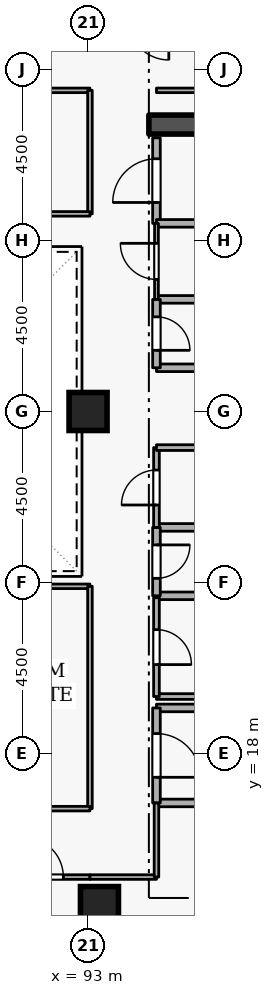
"""IFC4 building model, lengths in metres.
Left out: names, types, materials, properties, quantities, classifications, styles, units other than length and angle.
Written with IfcOpenShell. Run it as: python <this file> out.ifc"""

import sys

from ifc_helpers import new_model, si_unit, direction, frame, frame_2d, origin, origin_2d, place, context, subcontext, project, spatial, rectangle, extrude, element, fill, save


model = new_model("IFC4")
c1 = context("Model", 3, precision=1e-05, world=origin(), true_north=direction((0.0, 1.0)))
c2 = subcontext(c1, "Body", "Model", "MODEL_VIEW")
j1 = project(units=[si_unit("LENGTHUNIT", "METRE"), si_unit("PLANEANGLEUNIT", "RADIAN")], contexts=[c1])
p1 = place(None, origin())
s1 = spatial("IfcSite", under=j1, at=p1, CompositionType="ELEMENT")
p2 = place(p1, origin())
s2 = spatial("IfcBuilding", under=s1, at=p2, CompositionType="ELEMENT")
p3 = place(p2, frame((0.0, 0.0, 207.3)))
s3 = spatial("IfcBuildingStorey", under=s2, at=p3, CompositionType="ELEMENT", Elevation=207.3)
p4 = place(p3, frame((94.6, 34.55, 0.0), z_axis=(0.0, 0.0, 1.0), x_axis=(1.0, 0.0, 0.0)))
e1 = element("IfcWall", 1, at=p4, inside=s3, PredefinedType="SHEAR", context=c2, shape_type="SweptSolid", body=[
    extrude(rectangle(XDim=5.8, YDim=0.5, at=frame_2d((2.9, 0.0))), origin(), (0.0, 0.0, 1.0), 3.6),
])
for number, where, z_axis, x_axis in (
    (2, (93.3, 14.0, 0.0), (0.0, 0.0, 1.0), (1.0, 0.0, 0.0)),
    (3, (93.0, 27.0, 0.0), (0.0, 0.0, 1.0), (1.0, 0.0, 0.0)),
):
    element("IfcColumn", number, at=place(p3, frame(where, z_axis=z_axis, x_axis=x_axis)), inside=s3, PredefinedType="COLUMN", context=c2, shape_type="SweptSolid", body=[
        extrude(rectangle(XDim=1.0, YDim=1.0, at=origin_2d()), origin(), (0.0, 0.0, 1.0), 3.6),
    ])
p5 = place(p3, frame((94.8, 16.7, 0.0), z_axis=(0.0, 0.0, 1.0), x_axis=(1.0, 0.0, 0.0)))
e4 = element("IfcWall", 4, at=p5, inside=s3, PredefinedType="STANDARD", context=c2, shape_type="SweptSolid", body=[
    extrude(rectangle(XDim=5.7, YDim=0.2, at=frame_2d((2.85, 0.0))), origin(), (0.0, 0.0, 1.0), 3.34),
])
p6 = place(p3, frame((97.1, 19.2, 0.0), z_axis=(0.0, 0.0, 1.0), x_axis=(-1.0, 0.0, 0.0)))
e5 = element("IfcWall", 5, at=p6, inside=s3, PredefinedType="STANDARD", context=c2, shape_type="SweptSolid", body=[
    extrude(rectangle(XDim=2.3, YDim=0.2, at=frame_2d((1.15, 0.0))), origin(), (0.0, 0.0, 1.0), 2.545),
])
p7 = place(p3, frame((94.8, 19.2, 0.0), z_axis=(0.0, 0.0, 1.0), x_axis=(0.0, -1.0, 0.0)))
e6 = element("IfcWall", 6, at=p7, inside=s3, PredefinedType="STANDARD", context=c2, shape_type="SweptSolid", body=[
    extrude(rectangle(XDim=2.5, YDim=0.2, at=frame_2d((1.25, 0.0))), origin(), (0.0, 0.0, 1.0), 3.34),
])
p8 = place(p7, frame((0.675, 0.0, 0.0)))
e7 = element("IfcOpeningElement", 7, at=p8, cuts=e6, PredefinedType="OPENING", context=c2, shape_type="SweptSolid", body=[
    extrude(rectangle(XDim=1.15, YDim=2.1, at=frame_2d((0.575, 1.05))), frame((0.0, 0.11, 0.0), z_axis=(0.0, -1.0, 0.0), x_axis=(1.0, 0.0, 0.0)), (0.0, 0.0, 1.0), 0.22),
])
for number, where, z_axis, x_axis in (
    (8, (94.8, 28.15, 0.0), (0.0, 0.0, 1.0), (1.0, 0.0, 0.0)),
    (9, (96.85, 29.95, 0.0), (0.0, 0.0, 1.0), (-1.0, 0.0, 0.0)),
):
    element("IfcWall", number, at=place(p3, frame(where, z_axis=z_axis, x_axis=x_axis)), inside=s3, PredefinedType="STANDARD", context=c2, shape_type="SweptSolid", body=[
        extrude(rectangle(XDim=2.05, YDim=0.2, at=frame_2d((1.025, 0.0))), origin(), (0.0, 0.0, 1.0), 3.34),
    ])
p9 = place(p3, frame((94.8, 29.95, 0.0), z_axis=(0.0, 0.0, 1.0), x_axis=(0.0, -1.0, 0.0)))
e10 = element("IfcWall", 10, at=p9, inside=s3, PredefinedType="STANDARD", context=c2, shape_type="SweptSolid", body=[
    extrude(rectangle(XDim=1.8, YDim=0.2, at=frame_2d((0.9, 0.0))), origin(), (0.0, 0.0, 1.0), 3.34),
])
p10 = place(p9, frame((0.46, 0.0, 0.0)))
e11 = element("IfcOpeningElement", 11, at=p10, cuts=e10, PredefinedType="OPENING", context=c2, shape_type="SweptSolid", body=[
    extrude(rectangle(XDim=0.88, YDim=2.04, at=frame_2d((0.44, 1.02))), frame((0.0, 0.11, 0.0), z_axis=(0.0, -1.0, 0.0), x_axis=(1.0, 0.0, 0.0)), (0.0, 0.0, 1.0), 0.22),
])
for number, where, z_axis, x_axis in (
    (12, (94.8, 22.15, 0.0), (0.0, 0.0, 1.0), (1.0, 0.0, 0.0)),
    (13, (96.85, 23.95, 0.0), (0.0, 0.0, 1.0), (-1.0, 0.0, 0.0)),
):
    element("IfcWall", number, at=place(p3, frame(where, z_axis=z_axis, x_axis=x_axis)), inside=s3, PredefinedType="STANDARD", context=c2, shape_type="SweptSolid", body=[
        extrude(rectangle(XDim=2.05, YDim=0.2, at=frame_2d((1.025, 0.0))), origin(), (0.0, 0.0, 1.0), 3.34),
    ])
p11 = place(p3, frame((94.8, 23.95, 0.0), z_axis=(0.0, 0.0, 1.0), x_axis=(0.0, -1.0, 0.0)))
e14 = element("IfcWall", 14, at=p11, inside=s3, PredefinedType="STANDARD", context=c2, shape_type="SweptSolid", body=[
    extrude(rectangle(XDim=1.8, YDim=0.2, at=frame_2d((0.9, 0.0))), origin(), (0.0, 0.0, 1.0), 3.34),
])
p12 = place(p11, frame((0.46, 0.0, 0.0)))
e15 = element("IfcOpeningElement", 15, at=p12, cuts=e14, PredefinedType="OPENING", context=c2, shape_type="SweptSolid", body=[
    extrude(rectangle(XDim=0.88, YDim=2.04, at=frame_2d((0.44, 1.02))), frame((0.0, 0.11, 0.0), z_axis=(0.0, -1.0, 0.0), x_axis=(1.0, 0.0, 0.0)), (0.0, 0.0, 1.0), 0.22),
])
p13 = place(p3, frame((94.8, 31.95, 0.0), z_axis=(0.0, 0.0, 1.0), x_axis=(0.0, 1.0, 0.0)))
e16 = element("IfcWall", 16, at=p13, inside=s3, PredefinedType="STANDARD", context=c2, shape_type="SweptSolid", body=[
    extrude(rectangle(XDim=2.25, YDim=0.2, at=frame_2d((1.125, 0.0))), origin(), (0.0, 0.0, 1.0), 3.34),
])
p14 = place(p13, frame((0.55, 0.0, 0.0)))
e17 = element("IfcOpeningElement", 17, at=p14, cuts=e16, PredefinedType="OPENING", context=c2, shape_type="SweptSolid", body=[
    extrude(rectangle(XDim=1.15, YDim=2.1, at=frame_2d((0.575, 1.05))), frame((0.0, 0.11, 0.0), z_axis=(0.0, -1.0, 0.0), x_axis=(1.0, 0.0, 0.0)), (0.0, 0.0, 1.0), 0.22),
])
p15 = place(p3, frame((96.85, 31.95, 0.0), z_axis=(0.0, 0.0, 1.0), x_axis=(-1.0, 0.0, 0.0)))
e18 = element("IfcWall", 18, at=p15, inside=s3, PredefinedType="STANDARD", context=c2, shape_type="SweptSolid", body=[
    extrude(rectangle(XDim=2.05, YDim=0.2, at=frame_2d((1.025, 0.0))), origin(), (0.0, 0.0, 1.0), 3.34),
])
p16 = place(p3, frame((94.8, 19.5, 0.0), z_axis=(0.0, 0.0, 1.0), x_axis=(1.0, 0.0, 0.0)))
e19 = element("IfcWall", 19, at=p16, inside=s3, PredefinedType="PARTITIONING", context=c2, shape_type="SweptSolid", body=[
    extrude(rectangle(XDim=2.05, YDim=0.15, at=frame_2d((1.025, 0.0))), origin(), (0.0, 0.0, 1.0), 2.545),
])
p17 = place(p3, frame((94.8, 22.1, 0.0), z_axis=(0.0, 0.0, 1.0), x_axis=(0.0, -1.0, 0.0)))
e20 = element("IfcWall", 20, at=p17, inside=s3, PredefinedType="PARTITIONING", context=c2, shape_type="SweptSolid", body=[
    extrude(rectangle(XDim=2.6, YDim=0.15, at=frame_2d((1.3, 0.0))), origin(), (0.0, 0.0, 1.0), 3.34),
])
p18 = place(p17, frame((0.84, 0.0, 0.0)))
e21 = element("IfcOpeningElement", 21, at=p18, cuts=e20, PredefinedType="OPENING", context=c2, shape_type="SweptSolid", body=[
    extrude(rectangle(XDim=0.92, YDim=2.08, at=frame_2d((0.46, 1.04))), frame((0.0, 0.085, 0.0), z_axis=(0.0, -1.0, 0.0), x_axis=(1.0, 0.0, 0.0)), (0.0, 0.0, 1.0), 0.17),
])
p19 = place(p3, frame((94.8, 23.95, 0.0), z_axis=(0.0, 0.0, 1.0), x_axis=(0.0, 1.0, 0.0)))
e22 = element("IfcWall", 22, at=p19, inside=s3, PredefinedType="PARTITIONING", context=c2, shape_type="SweptSolid", body=[
    extrude(rectangle(XDim=2.1, YDim=0.15, at=frame_2d((1.05, 0.0))), origin(), (0.0, 0.0, 1.0), 3.34),
])
p20 = place(p19, frame((0.59, 0.0, 0.0)))
e23 = element("IfcOpeningElement", 23, at=p20, cuts=e22, PredefinedType="OPENING", context=c2, shape_type="SweptSolid", body=[
    extrude(rectangle(XDim=0.92, YDim=2.08, at=frame_2d((0.46, 1.04))), frame((0.0, 0.085, 0.0), z_axis=(0.0, -1.0, 0.0), x_axis=(1.0, 0.0, 0.0)), (0.0, 0.0, 1.0), 0.17),
])
p21 = place(p3, frame((94.8, 26.05, 0.0), z_axis=(0.0, 0.0, 1.0), x_axis=(1.0, 0.0, 0.0)))
e24 = element("IfcWall", 24, at=p21, inside=s3, PredefinedType="PARTITIONING", context=c2, shape_type="SweptSolid", body=[
    extrude(rectangle(XDim=2.05, YDim=0.15, at=frame_2d((1.025, 0.0))), origin(), (0.0, 0.0, 1.0), 3.34),
])
p22 = place(p3, frame((94.8, 29.95, 0.0), z_axis=(0.0, 0.0, 1.0), x_axis=(0.0, 1.0, 0.0)))
e25 = element("IfcWall", 25, at=p22, inside=s3, PredefinedType="PARTITIONING", context=c2, shape_type="SweptSolid", body=[
    extrude(rectangle(XDim=2.0, YDim=0.1, at=frame_2d((1.0, 0.0))), origin(), (0.0, 0.0, 1.0), 3.34),
])
p23 = place(p22, frame((0.525, 0.0, 0.0)))
e26 = element("IfcOpeningElement", 26, at=p23, cuts=e25, PredefinedType="OPENING", context=c2, shape_type="SweptSolid", body=[
    extrude(rectangle(XDim=0.95, YDim=2.1, at=frame_2d((0.475, 1.05))), frame((0.0, 0.06, 0.0), z_axis=(0.0, -1.0, 0.0), x_axis=(1.0, 0.0, 0.0)), (0.0, 0.0, 1.0), 0.12),
])
p24 = place(p3, frame((94.8, 35.45, 0.0), z_axis=(0.0, 0.0, 1.0), x_axis=(1.0, 0.0, 0.0)))
e27 = element("IfcWall", 27, at=p24, inside=s3, PredefinedType="PARTITIONING", context=c2, shape_type="SweptSolid", body=[
    extrude(rectangle(XDim=5.9, YDim=0.12, at=frame_2d((2.95, 0.0))), origin(), (0.0, 0.0, 1.0), 3.34),
])
p25 = place(p3, frame((90.6, 14.75, 0.0), z_axis=(0.0, 0.0, 1.0), x_axis=(1.0, 0.0, 0.0)))
e28 = element("IfcWall", 28, at=p25, inside=s3, PredefinedType="PARTITIONING", context=c2, shape_type="SweptSolid", body=[
    extrude(rectangle(XDim=2.45, YDim=0.12, at=frame_2d((1.225, 0.0))), origin(), (0.0, 0.0, 1.0), 3.34),
])
p26 = place(p25, frame((0.7, 0.0, 0.0)))
e29 = element("IfcOpeningElement", 29, at=p26, cuts=e28, PredefinedType="OPENING", context=c2, shape_type="SweptSolid", body=[
    extrude(rectangle(XDim=1.05, YDim=2.1, at=frame_2d((0.525, 1.05))), frame((0.0, 0.07, 0.0), z_axis=(0.0, -1.0, 0.0), x_axis=(1.0, 0.0, 0.0)), (0.0, 0.0, 1.0), 0.14),
])
p27 = place(p3, frame((93.05, 14.75, 0.0), z_axis=(0.0, 0.0, 1.0), x_axis=(1.0, 0.0, 0.0)))
e30 = element("IfcWall", 30, at=p27, inside=s3, PredefinedType="PARTITIONING", context=c2, shape_type="SweptSolid", body=[
    extrude(rectangle(XDim=1.75, YDim=0.12, at=frame_2d((0.875, 0.0))), origin(), (0.0, 0.0, 1.0), 3.34),
])
p28 = place(p3, frame((94.8, 14.75, 0.0), z_axis=(0.0, 0.0, 1.0), x_axis=(0.0, 1.0, 0.0)))
e31 = element("IfcWall", 31, at=p28, inside=s3, PredefinedType="PARTITIONING", context=c2, shape_type="SweptSolid", body=[
    extrude(rectangle(XDim=1.95, YDim=0.12, at=frame_2d((0.975, 0.0))), origin(), (0.0, 0.0, 1.0), 3.34),
])
p29 = place(p3, frame((83.95, 22.4, 0.0), z_axis=(0.0, 0.0, 1.0), x_axis=(1.0, 0.0, 0.0)))
e32 = element("IfcWall", 32, at=p29, inside=s3, PredefinedType="PARTITIONING", context=c2, shape_type="SweptSolid", body=[
    extrude(rectangle(XDim=9.1, YDim=0.12, at=frame_2d((4.55, 0.0))), origin(), (0.0, 0.0, 1.0), 3.34),
])
p30 = place(p3, frame((93.05, 22.4, 0.0), z_axis=(0.0, 0.0, 1.0), x_axis=(0.0, -1.0, 0.0)))
e33 = element("IfcWall", 33, at=p30, inside=s3, PredefinedType="PARTITIONING", context=c2, shape_type="SweptSolid", body=[
    extrude(rectangle(XDim=5.85, YDim=0.12, at=frame_2d((2.925, 0.0))), origin(), (0.0, 0.0, 1.0), 3.34),
])
p31 = place(p3, frame((93.05, 16.55, 0.0), z_axis=(0.0, 0.0, 1.0), x_axis=(-1.0, 0.0, 0.0)))
e34 = element("IfcWall", 34, at=p31, inside=s3, PredefinedType="PARTITIONING", context=c2, shape_type="SweptSolid", body=[
    extrude(rectangle(XDim=9.1, YDim=0.12, at=frame_2d((4.55, 0.0))), origin(), (0.0, 0.0, 1.0), 3.34),
])
p32 = place(p31, frame((4.075, 0.0, 0.0)))
e35 = element("IfcOpeningElement", 35, at=p32, cuts=e34, PredefinedType="OPENING", context=c2, shape_type="SweptSolid", body=[
    extrude(rectangle(XDim=0.95, YDim=2.1, at=frame_2d((0.475, 1.05))), frame((0.0, 0.07, 0.0), z_axis=(0.0, -1.0, 0.0), x_axis=(1.0, 0.0, 0.0)), (0.0, 0.0, 1.0), 0.14),
])
p33 = place(p3, frame((83.95, 35.45, 0.0), z_axis=(0.0, 0.0, 1.0), x_axis=(1.0, 0.0, 0.0)))
e36 = element("IfcWall", 36, at=p33, inside=s3, PredefinedType="PARTITIONING", context=c2, shape_type="SweptSolid", body=[
    extrude(rectangle(XDim=9.1, YDim=0.12, at=frame_2d((4.55, 0.0))), origin(), (0.0, 0.0, 1.0), 3.34),
])
p34 = place(p33, frame((4.075, 0.0, 0.0)))
e37 = element("IfcOpeningElement", 37, at=p34, cuts=e36, PredefinedType="OPENING", context=c2, shape_type="SweptSolid", body=[
    extrude(rectangle(XDim=0.95, YDim=2.1, at=frame_2d((0.475, 1.05))), frame((0.0, 0.07, 0.0), z_axis=(0.0, -1.0, 0.0), x_axis=(1.0, 0.0, 0.0)), (0.0, 0.0, 1.0), 0.14),
])
p35 = place(p3, frame((93.05, 35.45, 0.0), z_axis=(0.0, 0.0, 1.0), x_axis=(0.0, -1.0, 0.0)))
e38 = element("IfcWall", 38, at=p35, inside=s3, PredefinedType="PARTITIONING", context=c2, shape_type="SweptSolid", body=[
    extrude(rectangle(XDim=3.25, YDim=0.12, at=frame_2d((1.625, 0.0))), origin(), (0.0, 0.0, 1.0), 3.34),
])
p36 = place(p3, frame((93.05, 32.2, 0.0), z_axis=(0.0, 0.0, 1.0), x_axis=(-1.0, 0.0, 0.0)))
e39 = element("IfcWall", 39, at=p36, inside=s3, PredefinedType="PARTITIONING", context=c2, shape_type="SweptSolid", body=[
    extrude(rectangle(XDim=9.1, YDim=0.12, at=frame_2d((4.55, 0.0))), origin(), (0.0, 0.0, 1.0), 3.34),
])
p37 = place(p8, origin())
e40 = element("IfcDoor", 40, at=p37, inside=s3, OperationType="SINGLE_SWING_RIGHT", PredefinedType="DOOR", context=c2, shape_type="SweptSolid", body=[
    extrude(rectangle(XDim=1.15, YDim=2.1, at=frame_2d((0.575, 1.05))), frame((0.0, 0.025, 0.0), z_axis=(0.0, -1.0, 0.0), x_axis=(1.0, 0.0, 0.0)), (0.0, 0.0, 1.0), 0.05),
])
fill(e7, e40)
p38 = place(p10, origin())
e41 = element("IfcDoor", 41, at=p38, inside=s3, OperationType="SINGLE_SWING_RIGHT", PredefinedType="DOOR", context=c2, shape_type="SweptSolid", body=[
    extrude(rectangle(XDim=0.88, YDim=2.04, at=frame_2d((0.44, 1.02))), frame((0.0, 0.025, 0.0), z_axis=(0.0, -1.0, 0.0), x_axis=(1.0, 0.0, 0.0)), (0.0, 0.0, 1.0), 0.05),
])
fill(e11, e41)
p39 = place(p12, origin())
e42 = element("IfcDoor", 42, at=p39, inside=s3, OperationType="SINGLE_SWING_LEFT", PredefinedType="DOOR", context=c2, shape_type="SweptSolid", body=[
    extrude(rectangle(XDim=0.88, YDim=2.04, at=frame_2d((0.44, 1.02))), frame((0.0, 0.025, 0.0), z_axis=(0.0, -1.0, 0.0), x_axis=(1.0, 0.0, 0.0)), (0.0, 0.0, 1.0), 0.05),
])
fill(e15, e42)
p40 = place(p18, origin())
e43 = element("IfcDoor", 43, at=p40, inside=s3, OperationType="SINGLE_SWING_RIGHT", PredefinedType="DOOR", context=c2, shape_type="SweptSolid", body=[
    extrude(rectangle(XDim=0.92, YDim=2.08, at=frame_2d((0.46, 1.04))), frame((0.0, 0.025, 0.0), z_axis=(0.0, -1.0, 0.0), x_axis=(1.0, 0.0, 0.0)), (0.0, 0.0, 1.0), 0.05),
])
fill(e21, e43)
p41 = place(p20, origin())
e44 = element("IfcDoor", 44, at=p41, inside=s3, OperationType="SINGLE_SWING_LEFT", PredefinedType="DOOR", context=c2, shape_type="SweptSolid", body=[
    extrude(rectangle(XDim=0.92, YDim=2.08, at=frame_2d((0.46, 1.04))), frame((0.0, 0.025, 0.0), z_axis=(0.0, -1.0, 0.0), x_axis=(1.0, 0.0, 0.0)), (0.0, 0.0, 1.0), 0.05),
])
fill(e23, e44)
p42 = place(p23, origin())
e45 = element("IfcDoor", 45, at=p42, inside=s3, OperationType="SINGLE_SWING_RIGHT", PredefinedType="DOOR", context=c2, shape_type="SweptSolid", body=[
    extrude(rectangle(XDim=0.95, YDim=2.1, at=frame_2d((0.475, 1.05))), frame((0.0, 0.025, 0.0), z_axis=(0.0, -1.0, 0.0), x_axis=(1.0, 0.0, 0.0)), (0.0, 0.0, 1.0), 0.05),
])
fill(e26, e45)
p43 = place(p14, origin())
e46 = element("IfcDoor", 46, at=p43, inside=s3, OperationType="SINGLE_SWING_LEFT", PredefinedType="DOOR", context=c2, shape_type="SweptSolid", body=[
    extrude(rectangle(XDim=1.15, YDim=2.1, at=frame_2d((0.575, 1.05))), frame((0.0, 0.025, 0.0), z_axis=(0.0, -1.0, 0.0), x_axis=(1.0, 0.0, 0.0)), (0.0, 0.0, 1.0), 0.05),
])
fill(e17, e46)
p44 = place(p26, origin())
e47 = element("IfcDoor", 47, at=p44, inside=s3, OperationType="SINGLE_SWING_LEFT", PredefinedType="DOOR", context=c2, shape_type="SweptSolid", body=[
    extrude(rectangle(XDim=1.05, YDim=2.1, at=frame_2d((0.525, 1.05))), frame((0.0, 0.025, 0.0), z_axis=(0.0, -1.0, 0.0), x_axis=(1.0, 0.0, 0.0)), (0.0, 0.0, 1.0), 0.05),
])
fill(e29, e47)
save(model, sys.argv[1])
